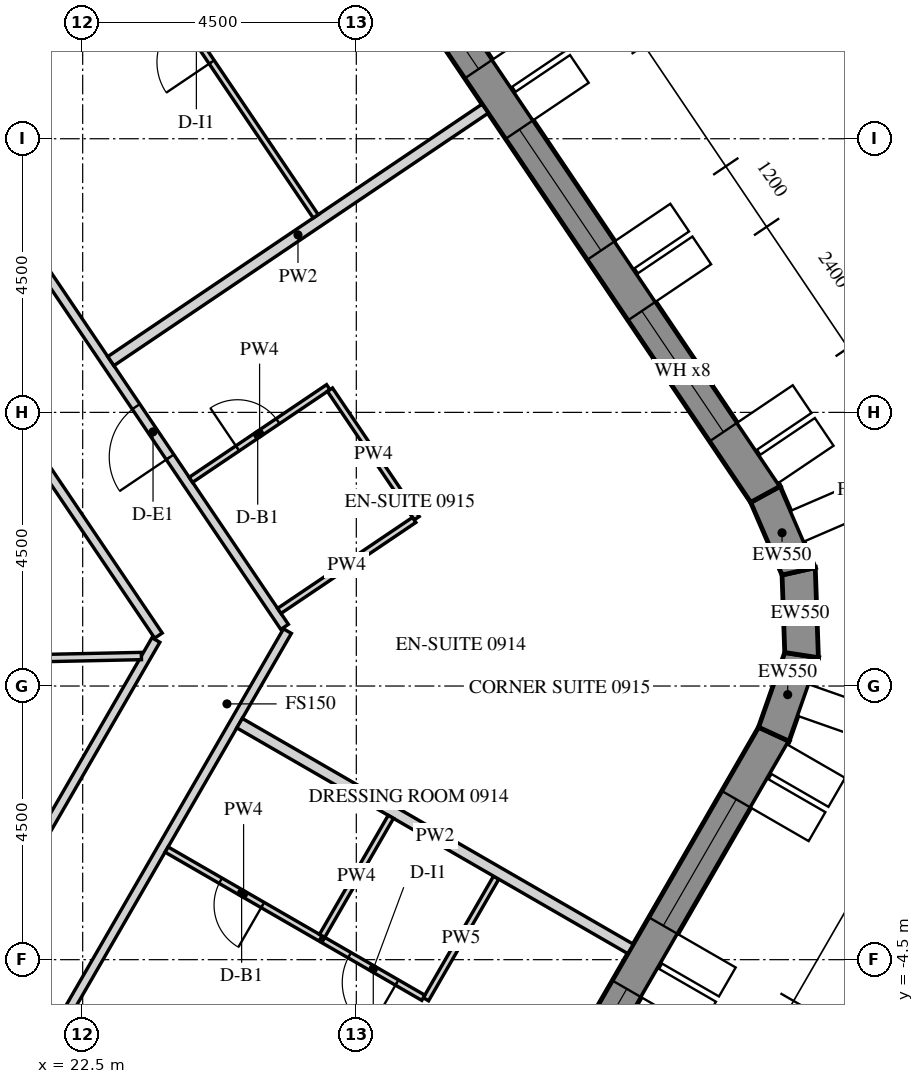
"""IFC4 building model, lengths in metres.
Left out: names, types, materials, properties, quantities, classifications, styles, units other than length and angle.
Written with IfcOpenShell. Run it as: python <this file> out.ifc"""

import sys

from ifc_helpers import new_model, si_unit, direction, frame, frame_2d, origin, place, context, subcontext, project, spatial, polyline, rectangle, outline, extrude, element, fill, save


model = new_model("IFC4")
c1 = context("Model", 3, precision=1e-05, world=origin(), true_north=direction((0.0, 1.0)))
c2 = subcontext(c1, "Body", "Model", "MODEL_VIEW")
j1 = project(units=[si_unit("LENGTHUNIT", "METRE"), si_unit("PLANEANGLEUNIT", "RADIAN")], contexts=[c1])
p1 = place(None, origin())
s1 = spatial("IfcSite", under=j1, at=p1, CompositionType="ELEMENT")
p2 = place(p1, origin())
s2 = spatial("IfcBuilding", under=s1, at=p2, CompositionType="ELEMENT")
p3 = place(p2, frame((0.0, 0.0, 123.3)))
s3 = spatial("IfcBuildingStorey", under=s2, at=p3, CompositionType="ELEMENT", Elevation=123.3)
p4 = place(p3, frame((18.83, -26.835, -0.15), z_axis=(0.0, 0.0, 1.0), x_axis=(0.500003800416, 0.866023209602, 0.0)))
e1 = element("IfcWall", 1, at=p4, inside=s3, PredefinedType="SOLIDWALL", context=c2, shape_type="SweptSolid", body=[
    extrude(outline(polyline([(-0.022, -0.275), (30.097, -0.275), (30.045, 0.275), (0.022, 0.275), (-0.022, -0.275)])), origin(), (0.0, 0.0, 1.0), 3.9),
])
p5 = place(p4, frame((1.236, 0.0, 1.05)))
e2 = element("IfcOpeningElement", 2, at=p5, cuts=e1, PredefinedType="OPENING", context=c2, shape_type="SweptSolid", body=[
    extrude(rectangle(XDim=2.4, YDim=2.4, at=frame_2d((1.2, 1.2))), frame((0.0, 0.285, 0.0), z_axis=(0.0, -1.0, 0.0), x_axis=(1.0, 0.0, 0.0)), (0.0, 0.0, 1.0), 0.57),
])
p6 = place(p4, frame((4.835, 0.0, 1.05)))
e3 = element("IfcOpeningElement", 3, at=p6, cuts=e1, PredefinedType="OPENING", context=c2, shape_type="SweptSolid", body=[
    extrude(rectangle(XDim=2.4, YDim=2.4, at=frame_2d((1.2, 1.2))), frame((0.0, 0.285, 0.0), z_axis=(0.0, -1.0, 0.0), x_axis=(1.0, 0.0, 0.0)), (0.0, 0.0, 1.0), 0.57),
])
p7 = place(p4, frame((8.436, 0.0, 1.05)))
e4 = element("IfcOpeningElement", 4, at=p7, cuts=e1, PredefinedType="OPENING", context=c2, shape_type="SweptSolid", body=[
    extrude(rectangle(XDim=2.4, YDim=2.4, at=frame_2d((1.2, 1.2))), frame((0.0, 0.285, 0.0), z_axis=(0.0, -1.0, 0.0), x_axis=(1.0, 0.0, 0.0)), (0.0, 0.0, 1.0), 0.57),
])
p8 = place(p4, frame((12.035, 0.0, 1.05)))
e5 = element("IfcOpeningElement", 5, at=p8, cuts=e1, PredefinedType="OPENING", context=c2, shape_type="SweptSolid", body=[
    extrude(rectangle(XDim=2.4, YDim=2.4, at=frame_2d((1.2, 1.2))), frame((0.0, 0.285, 0.0), z_axis=(0.0, -1.0, 0.0), x_axis=(1.0, 0.0, 0.0)), (0.0, 0.0, 1.0), 0.57),
])
p9 = place(p4, frame((15.635, 0.0, 1.05)))
e6 = element("IfcOpeningElement", 6, at=p9, cuts=e1, PredefinedType="OPENING", context=c2, shape_type="SweptSolid", body=[
    extrude(rectangle(XDim=2.4, YDim=2.4, at=frame_2d((1.2, 1.2))), frame((0.0, 0.285, 0.0), z_axis=(0.0, -1.0, 0.0), x_axis=(1.0, 0.0, 0.0)), (0.0, 0.0, 1.0), 0.57),
])
p10 = place(p4, frame((19.236, 0.0, 1.05)))
e7 = element("IfcOpeningElement", 7, at=p10, cuts=e1, PredefinedType="OPENING", context=c2, shape_type="SweptSolid", body=[
    extrude(rectangle(XDim=2.4, YDim=2.4, at=frame_2d((1.2, 1.2))), frame((0.0, 0.285, 0.0), z_axis=(0.0, -1.0, 0.0), x_axis=(1.0, 0.0, 0.0)), (0.0, 0.0, 1.0), 0.57),
])
p11 = place(p4, frame((22.835, 0.0, 1.05)))
e8 = element("IfcOpeningElement", 8, at=p11, cuts=e1, PredefinedType="OPENING", context=c2, shape_type="SweptSolid", body=[
    extrude(rectangle(XDim=2.4, YDim=2.4, at=frame_2d((1.2, 1.2))), frame((0.0, 0.285, 0.0), z_axis=(0.0, -1.0, 0.0), x_axis=(1.0, 0.0, 0.0)), (0.0, 0.0, 1.0), 0.57),
])
p12 = place(p4, frame((26.436, 0.0, 1.05)))
e9 = element("IfcOpeningElement", 9, at=p12, cuts=e1, PredefinedType="OPENING", context=c2, shape_type="SweptSolid", body=[
    extrude(rectangle(XDim=2.4, YDim=2.4, at=frame_2d((1.2, 1.2))), frame((0.0, 0.285, 0.0), z_axis=(0.0, -1.0, 0.0), x_axis=(1.0, 0.0, 0.0)), (0.0, 0.0, 1.0), 0.57),
])
p13 = place(p3, frame((33.866, -0.792, -0.15), z_axis=(0.0, 0.0, 1.0), x_axis=(0.33111537203, 0.943590276765, 0.0)))
e10 = element("IfcWall", 10, at=p13, inside=s3, PredefinedType="SOLIDWALL", context=c2, shape_type="SweptSolid", body=[
    extrude(outline(polyline([(-0.026, -0.275), (1.431, -0.275), (1.327, 0.275), (0.026, 0.275), (-0.026, -0.275)])), origin(), (0.0, 0.0, 1.0), 3.9),
])
p14 = place(p3, frame((34.323, 0.509, -0.15), z_axis=(0.0, 0.0, 1.0), x_axis=(-0.034876908462, 0.999391615562, 0.0)))
e11 = element("IfcWall", 11, at=p14, inside=s3, PredefinedType="SOLIDWALL", context=c2, shape_type="SweptSolid", body=[
    extrude(outline(polyline([(-0.052, -0.275), (1.431, -0.275), (1.327, 0.275), (0.052, 0.275), (-0.052, -0.275)])), origin(), (0.0, 0.0, 1.0), 3.9),
])
p15 = place(p3, frame((34.274, 1.887, -0.15), z_axis=(0.0, 0.0, 1.0), x_axis=(-0.396161342798, 0.918180913803, 0.0)))
e12 = element("IfcWall", 12, at=p15, inside=s3, PredefinedType="SOLIDWALL", context=c2, shape_type="SweptSolid", body=[
    extrude(outline(polyline([(-0.052, -0.275), (1.405, -0.275), (1.354, 0.275), (0.052, 0.275), (-0.052, -0.275)])), origin(), (0.0, 0.0, 1.0), 3.9),
])
p16 = place(p3, frame((33.728, 3.153, -0.15), z_axis=(0.0, 0.0, 1.0), x_axis=(-0.559192411416, 0.82903790445, 0.0)))
e13 = element("IfcWall", 13, at=p16, inside=s3, PredefinedType="SOLIDWALL", context=c2, shape_type="SweptSolid", body=[
    extrude(outline(polyline([(-0.026, -0.275), (30.093, -0.275), (30.048, 0.275), (0.026, 0.275), (-0.026, -0.275)])), origin(), (0.0, 0.0, 1.0), 3.9),
])
p17 = place(p16, frame((1.236, 0.0, 1.05)))
e14 = element("IfcOpeningElement", 14, at=p17, cuts=e13, PredefinedType="OPENING", context=c2, shape_type="SweptSolid", body=[
    extrude(rectangle(XDim=2.4, YDim=2.4, at=frame_2d((1.2, 1.2))), frame((0.0, 0.285, 0.0), z_axis=(0.0, -1.0, 0.0), x_axis=(1.0, 0.0, 0.0)), (0.0, 0.0, 1.0), 0.57),
])
p18 = place(p16, frame((4.835, 0.0, 1.05)))
e15 = element("IfcOpeningElement", 15, at=p18, cuts=e13, PredefinedType="OPENING", context=c2, shape_type="SweptSolid", body=[
    extrude(rectangle(XDim=2.4, YDim=2.4, at=frame_2d((1.2, 1.2))), frame((0.0, 0.285, 0.0), z_axis=(0.0, -1.0, 0.0), x_axis=(1.0, 0.0, 0.0)), (0.0, 0.0, 1.0), 0.57),
])
p19 = place(p16, frame((8.436, 0.0, 1.05)))
e16 = element("IfcOpeningElement", 16, at=p19, cuts=e13, PredefinedType="OPENING", context=c2, shape_type="SweptSolid", body=[
    extrude(rectangle(XDim=2.4, YDim=2.4, at=frame_2d((1.2, 1.2))), frame((0.0, 0.285, 0.0), z_axis=(0.0, -1.0, 0.0), x_axis=(1.0, 0.0, 0.0)), (0.0, 0.0, 1.0), 0.57),
])
p20 = place(p16, frame((12.035, 0.0, 1.05)))
e17 = element("IfcOpeningElement", 17, at=p20, cuts=e13, PredefinedType="OPENING", context=c2, shape_type="SweptSolid", body=[
    extrude(rectangle(XDim=2.4, YDim=2.4, at=frame_2d((1.2, 1.2))), frame((0.0, 0.285, 0.0), z_axis=(0.0, -1.0, 0.0), x_axis=(1.0, 0.0, 0.0)), (0.0, 0.0, 1.0), 0.57),
])
p21 = place(p16, frame((15.635, 0.0, 1.05)))
e18 = element("IfcOpeningElement", 18, at=p21, cuts=e13, PredefinedType="OPENING", context=c2, shape_type="SweptSolid", body=[
    extrude(rectangle(XDim=2.4, YDim=2.4, at=frame_2d((1.2, 1.2))), frame((0.0, 0.285, 0.0), z_axis=(0.0, -1.0, 0.0), x_axis=(1.0, 0.0, 0.0)), (0.0, 0.0, 1.0), 0.57),
])
p22 = place(p16, frame((19.236, 0.0, 1.05)))
e19 = element("IfcOpeningElement", 19, at=p22, cuts=e13, PredefinedType="OPENING", context=c2, shape_type="SweptSolid", body=[
    extrude(rectangle(XDim=2.4, YDim=2.4, at=frame_2d((1.2, 1.2))), frame((0.0, 0.285, 0.0), z_axis=(0.0, -1.0, 0.0), x_axis=(1.0, 0.0, 0.0)), (0.0, 0.0, 1.0), 0.57),
])
p23 = place(p16, frame((22.835, 0.0, 1.05)))
e20 = element("IfcOpeningElement", 20, at=p23, cuts=e13, PredefinedType="OPENING", context=c2, shape_type="SweptSolid", body=[
    extrude(rectangle(XDim=2.4, YDim=2.4, at=frame_2d((1.2, 1.2))), frame((0.0, 0.285, 0.0), z_axis=(0.0, -1.0, 0.0), x_axis=(1.0, 0.0, 0.0)), (0.0, 0.0, 1.0), 0.57),
])
p24 = place(p16, frame((26.436, 0.0, 1.05)))
e21 = element("IfcOpeningElement", 21, at=p24, cuts=e13, PredefinedType="OPENING", context=c2, shape_type="SweptSolid", body=[
    extrude(rectangle(XDim=2.4, YDim=2.4, at=frame_2d((1.2, 1.2))), frame((0.0, 0.285, 0.0), z_axis=(0.0, -1.0, 0.0), x_axis=(1.0, 0.0, 0.0)), (0.0, 0.0, 1.0), 0.57),
])
p25 = place(p3, frame((13.928, -19.775, 0.0), z_axis=(0.0, 0.0, 1.0), x_axis=(0.50000450071, 0.866022805283, 0.0)))
e22 = element("IfcWall", 22, at=p25, inside=s3, PredefinedType="PARTITIONING", context=c2, shape_type="SweptSolid", body=[
    extrude(rectangle(XDim=23.877, YDim=0.15, at=frame_2d((11.938, 0.0))), origin(), (0.0, 0.0, 1.0), 2.988),
])
p26 = place(p25, frame((2.043, 0.0, 0.0)))
e23 = element("IfcOpeningElement", 23, at=p26, cuts=e22, PredefinedType="OPENING", context=c2, shape_type="SweptSolid", body=[
    extrude(rectangle(XDim=1.0, YDim=2.1, at=frame_2d((0.5, 1.05))), frame((0.0, 0.085, 0.0), z_axis=(0.0, -1.0, 0.0), x_axis=(1.0, 0.0, 0.0)), (0.0, 0.0, 1.0), 0.17),
])
p27 = place(p25, frame((13.272, 0.0, 0.0)))
e24 = element("IfcOpeningElement", 24, at=p27, cuts=e22, PredefinedType="OPENING", context=c2, shape_type="SweptSolid", body=[
    extrude(rectangle(XDim=1.0, YDim=2.1, at=frame_2d((0.5, 1.05))), frame((0.0, 0.085, 0.0), z_axis=(0.0, -1.0, 0.0), x_axis=(1.0, 0.0, 0.0)), (0.0, 0.0, 1.0), 0.17),
])
p28 = place(p3, frame((25.821, 0.972, 0.0), z_axis=(0.0, 0.0, 1.0), x_axis=(-0.559193816298, 0.829036956845, 0.0)))
e25 = element("IfcWall", 25, at=p28, inside=s3, PredefinedType="PARTITIONING", context=c2, shape_type="SweptSolid", body=[
    extrude(rectangle(XDim=22.002, YDim=0.15, at=frame_2d((11.001, 0.0))), origin(), (0.0, 0.0, 1.0), 2.988),
])
p29 = place(p28, frame((3.369, 0.0, 0.0)))
e26 = element("IfcOpeningElement", 26, at=p29, cuts=e25, PredefinedType="OPENING", context=c2, shape_type="SweptSolid", body=[
    extrude(rectangle(XDim=1.0, YDim=2.1, at=frame_2d((0.5, 1.05))), frame((0.0, 0.085, 0.0), z_axis=(0.0, -1.0, 0.0), x_axis=(1.0, 0.0, 0.0)), (0.0, 0.0, 1.0), 0.17),
])
p30 = place(p28, frame((10.721, 0.0, 0.0)))
e27 = element("IfcOpeningElement", 27, at=p30, cuts=e25, PredefinedType="OPENING", context=c2, shape_type="SweptSolid", body=[
    extrude(rectangle(XDim=1.0, YDim=2.1, at=frame_2d((0.5, 1.05))), frame((0.0, 0.085, 0.0), z_axis=(0.0, -1.0, 0.0), x_axis=(1.0, 0.0, 0.0)), (0.0, 0.0, 1.0), 0.17),
])
p31 = place(p28, frame((20.852, 0.0, 0.0)))
e28 = element("IfcOpeningElement", 28, at=p31, cuts=e25, PredefinedType="OPENING", context=c2, shape_type="SweptSolid", body=[
    extrude(rectangle(XDim=1.0, YDim=2.1, at=frame_2d((0.5, 1.05))), frame((0.0, 0.085, 0.0), z_axis=(0.0, -1.0, 0.0), x_axis=(1.0, 0.0, 0.0)), (0.0, 0.0, 1.0), 0.17),
])
p32 = place(p3, frame((23.704, 0.757, 0.0), z_axis=(0.0, 0.0, 1.0), x_axis=(-0.500010297365, -0.866019458516, 0.0)))
e29 = element("IfcWall", 29, at=p32, inside=s3, PredefinedType="PARTITIONING", context=c2, shape_type="SweptSolid", body=[
    extrude(rectangle(XDim=11.429, YDim=0.15, at=frame_2d((5.714, 0.0))), origin(), (0.0, 0.0, 1.0), 2.988),
])
p33 = place(p32, frame((5.264, 0.0, 0.0)))
e30 = element("IfcOpeningElement", 30, at=p33, cuts=e29, PredefinedType="OPENING", context=c2, shape_type="SweptSolid", body=[
    extrude(rectangle(XDim=0.9, YDim=2.1, at=frame_2d((0.45, 1.05))), frame((0.0, 0.085, 0.0), z_axis=(0.0, -1.0, 0.0), x_axis=(1.0, 0.0, 0.0)), (0.0, 0.0, 1.0), 0.17),
])
p34 = place(p3, frame((18.14, 9.141, 0.0), z_axis=(0.0, 0.0, 1.0), x_axis=(0.55918799196, -0.829040885389, 0.0)))
e31 = element("IfcWall", 31, at=p34, inside=s3, PredefinedType="PARTITIONING", context=c2, shape_type="SweptSolid", body=[
    extrude(rectangle(XDim=10.025, YDim=0.15, at=frame_2d((5.013, 0.0))), origin(), (0.0, 0.0, 1.0), 2.988),
])
p35 = place(p34, frame((4.563, 0.0, 0.0)))
e32 = element("IfcOpeningElement", 32, at=p35, cuts=e31, PredefinedType="OPENING", context=c2, shape_type="SweptSolid", body=[
    extrude(rectangle(XDim=0.9, YDim=2.1, at=frame_2d((0.45, 1.05))), frame((0.0, 0.085, 0.0), z_axis=(0.0, -1.0, 0.0), x_axis=(1.0, 0.0, 0.0)), (0.0, 0.0, 1.0), 0.17),
])
p36 = place(p3, frame((26.413, -4.152, 0.0), z_axis=(0.0, 0.0, 1.0), x_axis=(-0.86601045545, 0.500025890382, 0.0)))
e33 = element("IfcWall", 33, at=p36, inside=s3, PredefinedType="PARTITIONING", context=c2, shape_type="SweptSolid", body=[
    extrude(rectangle(XDim=2.925, YDim=0.1, at=frame_2d((1.462, 0.0))), origin(), (0.0, 0.0, 1.0), 2.988),
])
p37 = place(p36, frame((1.1, 0.0, 0.0)))
e34 = element("IfcOpeningElement", 34, at=p37, cuts=e33, PredefinedType="OPENING", context=c2, shape_type="SweptSolid", body=[
    extrude(rectangle(XDim=0.8, YDim=2.1, at=frame_2d((0.4, 1.05))), frame((0.0, 0.06, 0.0), z_axis=(0.0, -1.0, 0.0), x_axis=(1.0, 0.0, 0.0)), (0.0, 0.0, 1.0), 0.12),
])
p38 = place(p3, frame((29.3, -3.151, 0.0), z_axis=(0.0, 0.0, 1.0), x_axis=(-0.499935939261, -0.866062386111, 0.0)))
e35 = element("IfcWall", 35, at=p38, inside=s3, PredefinedType="PARTITIONING", context=c2, shape_type="SweptSolid", body=[
    extrude(rectangle(XDim=2.31, YDim=0.1, at=frame_2d((1.155, 0.0))), origin(), (0.0, 0.0, 1.0), 2.988),
])
p39 = place(p3, frame((28.102, -5.126, 0.0), z_axis=(0.0, 0.0, 1.0), x_axis=(-0.866044365799, 0.499967155389, 0.0)))
e36 = element("IfcWall", 36, at=p39, inside=s3, PredefinedType="PARTITIONING", context=c2, shape_type="SweptSolid", body=[
    extrude(rectangle(XDim=1.9, YDim=0.1, at=frame_2d((0.95, 0.0))), origin(), (0.0, 0.0, 1.0), 2.988),
])
p40 = place(p39, frame((0.5, 0.0, 0.0)))
e37 = element("IfcOpeningElement", 37, at=p40, cuts=e36, PredefinedType="OPENING", context=c2, shape_type="SweptSolid", body=[
    extrude(rectangle(XDim=0.9, YDim=2.1, at=frame_2d((0.45, 1.05))), frame((0.0, 0.06, 0.0), z_axis=(0.0, -1.0, 0.0), x_axis=(1.0, 0.0, 0.0)), (0.0, 0.0, 1.0), 0.12),
])
p41 = place(p3, frame((31.51, -4.323, 0.0), z_axis=(0.0, 0.0, 1.0), x_axis=(-0.866028983062, 0.499993800457, 0.0)))
e38 = element("IfcWall", 38, at=p41, inside=s3, PredefinedType="PARTITIONING", context=c2, shape_type="SweptSolid", body=[
    extrude(rectangle(XDim=7.425, YDim=0.18, at=frame_2d((3.712, 0.0))), origin(), (0.0, 0.0, 1.0), 2.988),
])
p42 = place(p3, frame((26.438, -4.108, 0.0), z_axis=(0.0, 0.0, 1.0), x_axis=(0.49995000081, 0.866054268906, 0.0)))
e39 = element("IfcWall", 39, at=p42, inside=s3, PredefinedType="PARTITIONING", context=c2, shape_type="SweptSolid", body=[
    extrude(rectangle(XDim=2.26, YDim=0.1, at=frame_2d((1.13, 0.0))), origin(), (0.0, 0.0, 1.0), 2.988),
])
p43 = place(p3, frame((24.28, 3.391, 0.0), z_axis=(0.0, 0.0, 1.0), x_axis=(0.829005477618, 0.559240483226, 0.0)))
e40 = element("IfcWall", 40, at=p43, inside=s3, PredefinedType="PARTITIONING", context=c2, shape_type="SweptSolid", body=[
    extrude(rectangle(XDim=2.725, YDim=0.1, at=frame_2d((1.363, 0.0))), origin(), (0.0, 0.0, 1.0), 2.988),
])
p44 = place(p43, frame((0.925, 0.0, 0.0)))
e41 = element("IfcOpeningElement", 41, at=p44, cuts=e40, PredefinedType="OPENING", context=c2, shape_type="SweptSolid", body=[
    extrude(rectangle(XDim=0.8, YDim=2.1, at=frame_2d((0.4, 1.05))), frame((0.0, 0.06, 0.0), z_axis=(0.0, -1.0, 0.0), x_axis=(1.0, 0.0, 0.0)), (0.0, 0.0, 1.0), 0.12),
])
p45 = place(p3, frame((26.567, 4.873, 0.0), z_axis=(0.0, 0.0, 1.0), x_axis=(0.559155442782, -0.829062838878, 0.0)))
e42 = element("IfcWall", 42, at=p45, inside=s3, PredefinedType="PARTITIONING", context=c2, shape_type="SweptSolid", body=[
    extrude(rectangle(XDim=2.55, YDim=0.1, at=frame_2d((1.275, 0.0))), origin(), (0.0, 0.0, 1.0), 2.988),
])
p46 = place(p3, frame((27.951, 2.731, 0.0), z_axis=(0.0, 0.0, 1.0), x_axis=(-0.82904753069, -0.559178139645, 0.0)))
e43 = element("IfcWall", 43, at=p46, inside=s3, PredefinedType="PARTITIONING", context=c2, shape_type="SweptSolid", body=[
    extrude(rectangle(XDim=2.675, YDim=0.1, at=frame_2d((1.337, 0.0))), origin(), (0.0, 0.0, 1.0), 2.988),
])
p47 = place(p3, frame((29.119, 9.495, 0.0), z_axis=(0.0, 0.0, 1.0), x_axis=(-0.829038452737, -0.559191598545, 0.0)))
e44 = element("IfcWall", 44, at=p47, inside=s3, PredefinedType="PARTITIONING", context=c2, shape_type="SweptSolid", body=[
    extrude(rectangle(XDim=7.425, YDim=0.18, at=frame_2d((3.713, 0.0))), origin(), (0.0, 0.0, 1.0), 2.988),
])
p48 = place(p3, frame((26.333, 7.724, 0.0), z_axis=(0.0, 0.0, 1.0), x_axis=(-0.559185029686, 0.829042883435, 0.0)))
e45 = element("IfcWall", 45, at=p48, inside=s3, PredefinedType="PARTITIONING", context=c2, shape_type="SweptSolid", body=[
    extrude(rectangle(XDim=7.11, YDim=0.1, at=frame_2d((3.555, 0.0))), origin(), (0.0, 0.0, 1.0), 2.988),
])
p49 = place(p48, frame((3.06, 0.0, 0.0)))
e46 = element("IfcOpeningElement", 46, at=p49, cuts=e45, PredefinedType="OPENING", context=c2, shape_type="SweptSolid", body=[
    extrude(rectangle(XDim=0.9, YDim=2.1, at=frame_2d((0.45, 1.05))), frame((0.0, 0.06, 0.0), z_axis=(0.0, -1.0, 0.0), x_axis=(1.0, 0.0, 0.0)), (0.0, 0.0, 1.0), 0.12),
])
p50 = place(p3, frame((23.466, 0.493, 0.0), z_axis=(0.0, 0.0, 1.0), x_axis=(-0.999779281543, -0.021009240783, 0.0)))
e47 = element("IfcWall", 47, at=p50, inside=s3, PredefinedType="PARTITIONING", context=c2, shape_type="SweptSolid", body=[
    extrude(rectangle(XDim=7.495, YDim=0.12, at=frame_2d((3.748, 0.0))), origin(), (0.0, 0.0, 1.0), 2.988),
])
p51 = place(p11, frame((0.0, 0.205, 0.0)))
e48 = element("IfcWindow", 48, at=p51, inside=s3, PartitioningType="DOUBLE_PANEL_VERTICAL", PredefinedType="WINDOW", context=c2, shape_type="SweptSolid", body=[
    extrude(rectangle(XDim=2.4, YDim=2.4, at=frame_2d((1.2, 1.2))), frame((0.0, 0.03, 0.0), z_axis=(0.0, -1.0, 0.0), x_axis=(1.0, 0.0, 0.0)), (0.0, 0.0, 1.0), 0.06),
])
fill(e8, e48)
p52 = place(p12, frame((0.0, 0.205, 0.0)))
e49 = element("IfcWindow", 49, at=p52, inside=s3, PartitioningType="DOUBLE_PANEL_VERTICAL", PredefinedType="WINDOW", context=c2, shape_type="SweptSolid", body=[
    extrude(rectangle(XDim=2.4, YDim=2.4, at=frame_2d((1.2, 1.2))), frame((0.0, 0.03, 0.0), z_axis=(0.0, -1.0, 0.0), x_axis=(1.0, 0.0, 0.0)), (0.0, 0.0, 1.0), 0.06),
])
fill(e9, e49)
p53 = place(p17, frame((0.0, 0.205, 0.0)))
e50 = element("IfcWindow", 50, at=p53, inside=s3, PartitioningType="DOUBLE_PANEL_VERTICAL", PredefinedType="WINDOW", context=c2, shape_type="SweptSolid", body=[
    extrude(rectangle(XDim=2.4, YDim=2.4, at=frame_2d((1.2, 1.2))), frame((0.0, 0.03, 0.0), z_axis=(0.0, -1.0, 0.0), x_axis=(1.0, 0.0, 0.0)), (0.0, 0.0, 1.0), 0.06),
])
fill(e14, e50)
p54 = place(p18, frame((0.0, 0.205, 0.0)))
e51 = element("IfcWindow", 51, at=p54, inside=s3, PartitioningType="DOUBLE_PANEL_VERTICAL", PredefinedType="WINDOW", context=c2, shape_type="SweptSolid", body=[
    extrude(rectangle(XDim=2.4, YDim=2.4, at=frame_2d((1.2, 1.2))), frame((0.0, 0.03, 0.0), z_axis=(0.0, -1.0, 0.0), x_axis=(1.0, 0.0, 0.0)), (0.0, 0.0, 1.0), 0.06),
])
fill(e15, e51)
p55 = place(p19, frame((0.0, 0.205, 0.0)))
e52 = element("IfcWindow", 52, at=p55, inside=s3, PartitioningType="DOUBLE_PANEL_VERTICAL", PredefinedType="WINDOW", context=c2, shape_type="SweptSolid", body=[
    extrude(rectangle(XDim=2.4, YDim=2.4, at=frame_2d((1.2, 1.2))), frame((0.0, 0.03, 0.0), z_axis=(0.0, -1.0, 0.0), x_axis=(1.0, 0.0, 0.0)), (0.0, 0.0, 1.0), 0.06),
])
fill(e16, e52)
p56 = place(p37, origin())
e53 = element("IfcDoor", 53, at=p56, inside=s3, OperationType="SINGLE_SWING_LEFT", PredefinedType="DOOR", context=c2, shape_type="SweptSolid", body=[
    extrude(rectangle(XDim=0.8, YDim=2.1, at=frame_2d((0.4, 1.05))), frame((0.0, 0.025, 0.0), z_axis=(0.0, -1.0, 0.0), x_axis=(1.0, 0.0, 0.0)), (0.0, 0.0, 1.0), 0.05),
])
fill(e34, e53)
p57 = place(p40, origin())
e54 = element("IfcDoor", 54, at=p57, inside=s3, OperationType="SINGLE_SWING_RIGHT", PredefinedType="DOOR", context=c2, shape_type="SweptSolid", body=[
    extrude(rectangle(XDim=0.9, YDim=2.1, at=frame_2d((0.45, 1.05))), frame((0.0, 0.025, 0.0), z_axis=(0.0, -1.0, 0.0), x_axis=(1.0, 0.0, 0.0)), (0.0, 0.0, 1.0), 0.05),
])
fill(e37, e54)
p58 = place(p29, origin())
e55 = element("IfcDoor", 55, at=p58, inside=s3, OperationType="SINGLE_SWING_LEFT", PredefinedType="DOOR", context=c2, shape_type="SweptSolid", body=[
    extrude(rectangle(XDim=1.0, YDim=2.1, at=frame_2d((0.5, 1.05))), frame((0.0, 0.025, 0.0), z_axis=(0.0, -1.0, 0.0), x_axis=(1.0, 0.0, 0.0)), (0.0, 0.0, 1.0), 0.05),
])
fill(e26, e55)
p59 = place(p44, origin())
e56 = element("IfcDoor", 56, at=p59, inside=s3, OperationType="SINGLE_SWING_RIGHT", PredefinedType="DOOR", context=c2, shape_type="SweptSolid", body=[
    extrude(rectangle(XDim=0.8, YDim=2.1, at=frame_2d((0.4, 1.05))), frame((0.0, 0.025, 0.0), z_axis=(0.0, -1.0, 0.0), x_axis=(1.0, 0.0, 0.0)), (0.0, 0.0, 1.0), 0.05),
])
fill(e41, e56)
p60 = place(p49, origin())
e57 = element("IfcDoor", 57, at=p60, inside=s3, OperationType="SINGLE_SWING_RIGHT", PredefinedType="DOOR", context=c2, shape_type="SweptSolid", body=[
    extrude(rectangle(XDim=0.9, YDim=2.1, at=frame_2d((0.45, 1.05))), frame((0.0, 0.025, 0.0), z_axis=(0.0, -1.0, 0.0), x_axis=(1.0, 0.0, 0.0)), (0.0, 0.0, 1.0), 0.05),
])
fill(e46, e57)
save(model, sys.argv[1])
